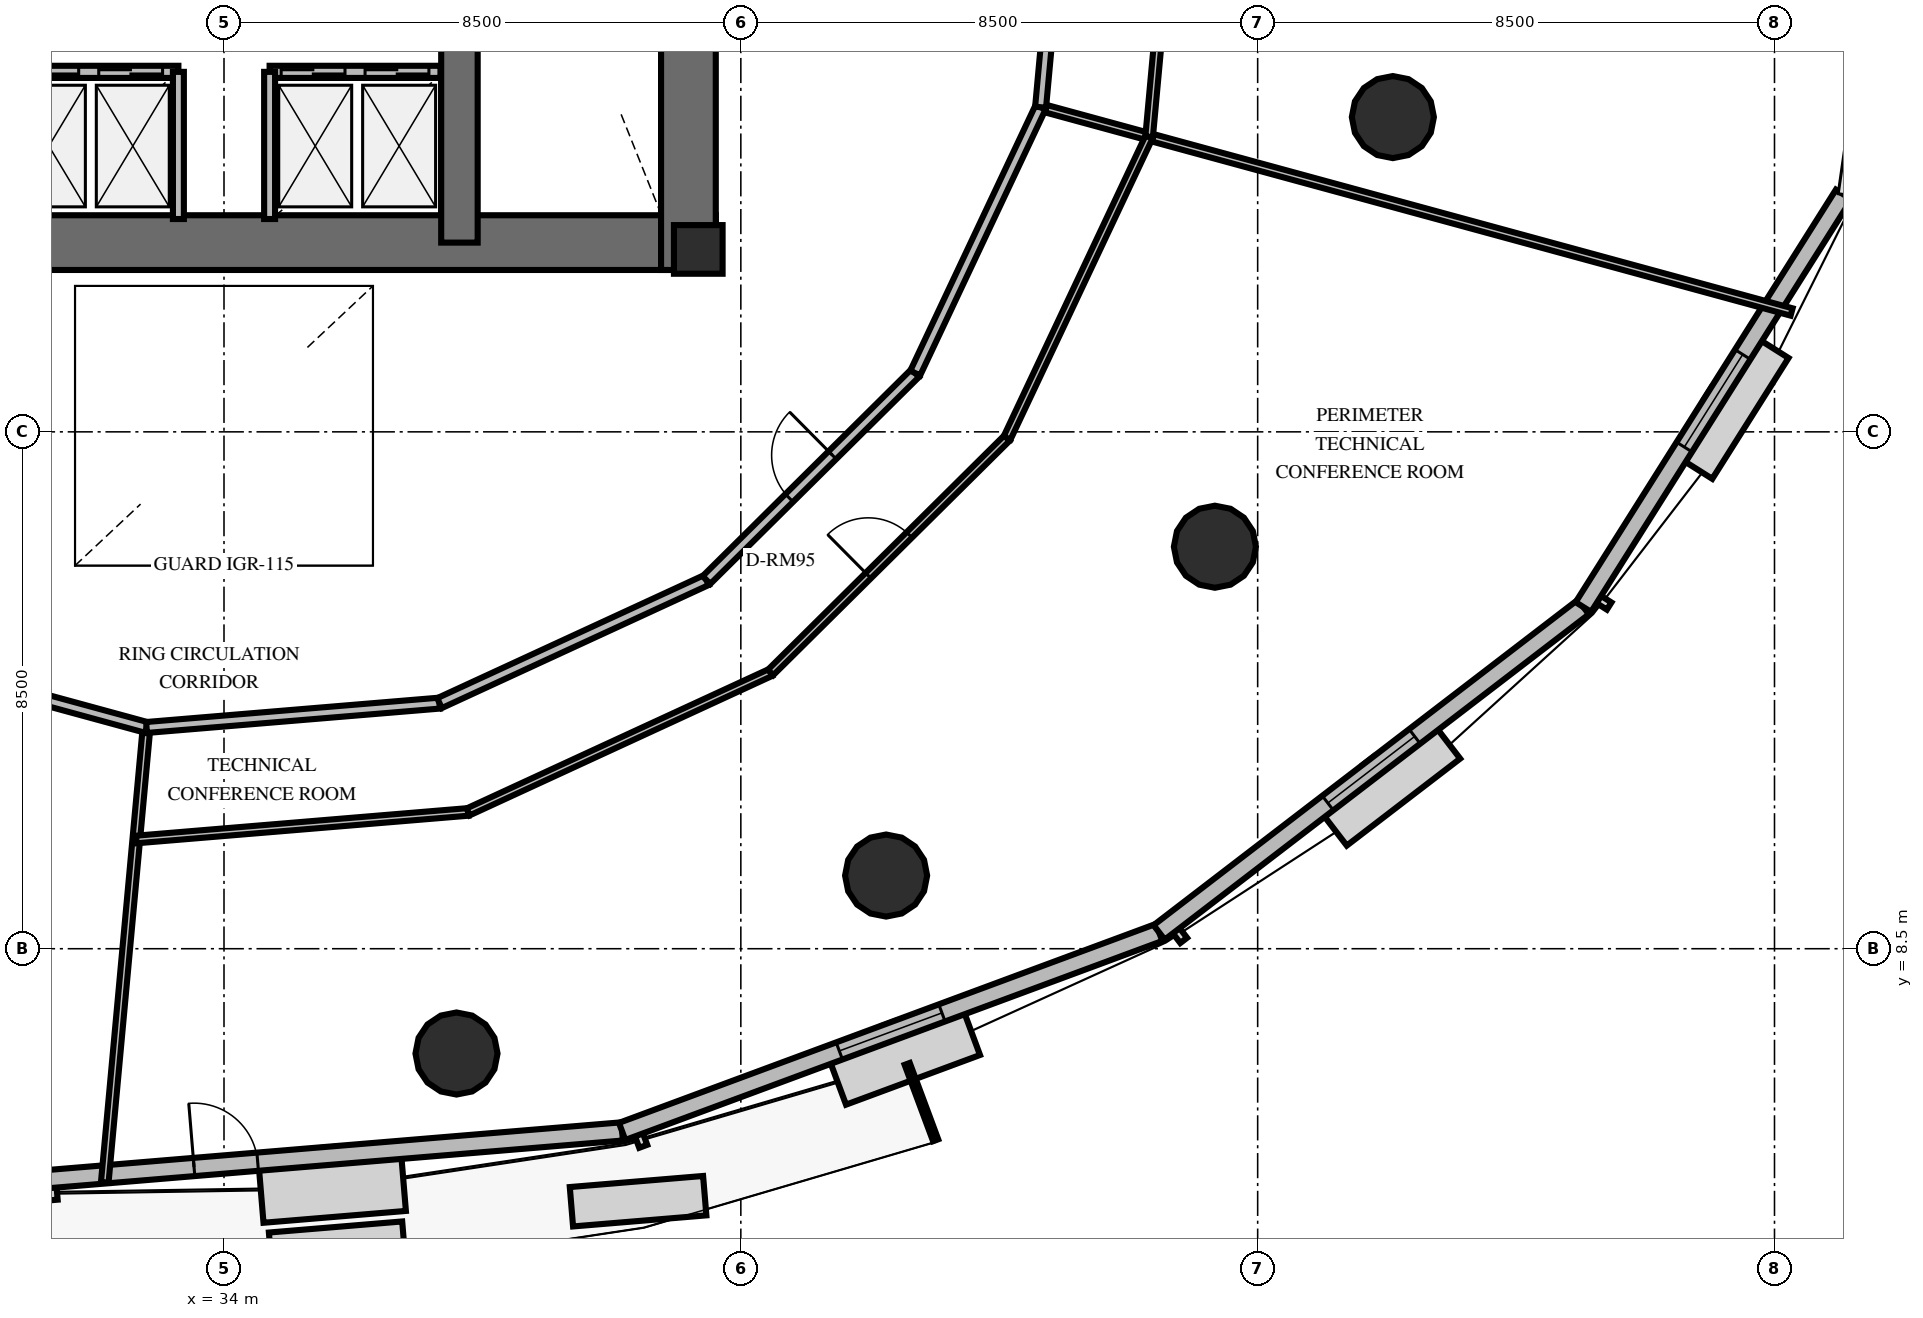
"""IFC4 building model, lengths in metres.
Left out: names, types, materials, properties, quantities, classifications, styles, units other than length and angle.
Written with IfcOpenShell. Run it as: python <this file> out.ifc"""

import sys

from ifc_helpers import new_model, si_unit, direction, frame, frame_2d, origin, origin_2d, place, context, subcontext, project, spatial, rectangle, circle, extrude, element, fill, save


model = new_model("IFC4")
c1 = context("Model", 3, precision=1e-05, world=origin(), true_north=direction((0.0, 1.0)))
c2 = subcontext(c1, "Body", "Model", "MODEL_VIEW")
j1 = project(units=[si_unit("LENGTHUNIT", "METRE"), si_unit("PLANEANGLEUNIT", "RADIAN")], contexts=[c1])
p1 = place(None, origin())
s1 = spatial("IfcSite", under=j1, at=p1, CompositionType="ELEMENT")
p2 = place(p1, origin())
s2 = spatial("IfcBuilding", under=s1, at=p2, CompositionType="ELEMENT")
p3 = place(p2, frame((0.0, 0.0, 51.0)))
s3 = spatial("IfcBuildingStorey", under=s2, at=p3, CompositionType="ELEMENT", Elevation=51.0)
p4 = place(p3, frame((25.922, 20.112, 0.0), z_axis=(0.0, 0.0, 1.0), x_axis=(1.0, 0.0, 0.0)))
e1 = element("IfcWall", 1, at=p4, inside=s3, PredefinedType="SHEAR", context=c2, shape_type="SweptSolid", body=[
    extrude(rectangle(XDim=16.166, YDim=0.9, at=frame_2d((8.083, 0.0))), origin(), (0.0, 0.0, 1.0), 4.2),
])
p5 = place(p3, frame((41.638, 19.662, 0.0), z_axis=(0.0, 0.0, 1.0), x_axis=(0.0, 1.0, 0.0)))
e2 = element("IfcWall", 2, at=p5, inside=s3, PredefinedType="SHEAR", context=c2, shape_type="SweptSolid", body=[
    extrude(rectangle(XDim=10.876, YDim=0.9, at=frame_2d((5.438, 0.0))), origin(), (0.0, 0.0, 1.0), 4.2),
])
p6 = place(p3, frame((37.872, 20.112, 0.0), z_axis=(0.0, 0.0, 1.0), x_axis=(0.0, 1.0, 0.0)))
e3 = element("IfcWall", 3, at=p6, inside=s3, PredefinedType="SHEAR", context=c2, shape_type="SweptSolid", body=[
    extrude(rectangle(XDim=9.976, YDim=0.6, at=frame_2d((4.988, 0.0))), origin(), (0.0, 0.0, 1.0), 4.2),
])
p7 = place(p3, frame((41.8, 20.0, 0.0), z_axis=(0.0, 0.0, 1.0), x_axis=(1.0, 0.0, 0.0)))
e4 = element("IfcColumn", 4, at=p7, inside=s3, PredefinedType="PILASTER", context=c2, shape_type="SweptSolid", body=[
    extrude(rectangle(XDim=0.8, YDim=0.8, at=origin_2d()), origin(), (0.0, 0.0, 1.0), 4.2),
])
for number, where, z_axis, x_axis in (
    (5, (37.824, 6.777, 0.0), (0.0, 0.0, 1.0), (1.0, 0.0, 0.0)),
    (6, (44.889, 9.703, 0.0), (0.0, 0.0, 1.0), (1.0, 0.0, 0.0)),
    (7, (50.297, 15.111, 0.0), (0.0, 0.0, 1.0), (1.0, 0.0, 0.0)),
    (8, (53.223, 22.176, 0.0), (0.0, 0.0, 1.0), (1.0, 0.0, 0.0)),
):
    element("IfcColumn", number, at=place(p3, frame(where, z_axis=z_axis, x_axis=x_axis)), inside=s3, PredefinedType="COLUMN", context=c2, shape_type="SweptSolid", body=[
        extrude(circle(Radius=0.675, at=origin_2d()), origin(), (0.0, 0.0, 1.0), 4.2),
    ])
p8 = place(p3, frame((30.926, 4.696, 0.0), z_axis=(0.0, 0.0, 1.0), x_axis=(0.99656491498, 0.082815277761, 0.0)))
e9 = element("IfcWall", 9, at=p8, inside=s3, PredefinedType="SOLIDWALL", context=c2, shape_type="SweptSolid", body=[
    extrude(rectangle(XDim=9.655, YDim=0.3, at=frame_2d((4.827, 0.0))), origin(), (0.0, 0.0, 1.0), 3.0),
])
p9 = place(p8, frame((2.59, 0.0, 0.0)))
e10 = element("IfcOpeningElement", 10, at=p9, cuts=e9, PredefinedType="OPENING", context=c2, shape_type="SweptSolid", body=[
    extrude(rectangle(XDim=1.05, YDim=2.15, at=frame_2d((0.525, 1.075))), frame((0.0, 0.16, 0.0), z_axis=(0.0, -1.0, 0.0), x_axis=(1.0, 0.0, 0.0)), (0.0, 0.0, 1.0), 0.32),
])
p10 = place(p3, frame((40.548, 5.495, 0.0), z_axis=(0.0, 0.0, 1.0), x_axis=(0.937694031854, 0.347462088042, 0.0)))
e11 = element("IfcWall", 11, at=p10, inside=s3, PredefinedType="SOLIDWALL", context=c2, shape_type="SweptSolid", body=[
    extrude(rectangle(XDim=9.419, YDim=0.3, at=frame_2d((4.709, 0.0))), origin(), (0.0, 0.0, 1.0), 3.0),
])
p11 = place(p10, frame((3.809, 0.0, 0.8)))
e12 = element("IfcOpeningElement", 12, at=p11, cuts=e11, PredefinedType="OPENING", context=c2, shape_type="SweptSolid", body=[
    extrude(rectangle(XDim=1.8, YDim=1.95, at=frame_2d((0.9, 0.975))), frame((0.0, 0.16, 0.0), z_axis=(0.0, -1.0, 0.0), x_axis=(1.0, 0.0, 0.0)), (0.0, 0.0, 1.0), 0.32),
])
p12 = place(p3, frame((49.38, 8.768, 0.0), z_axis=(0.0, 0.0, 1.0), x_axis=(0.793486127498, 0.608588338262, 0.0)))
e13 = element("IfcWall", 13, at=p12, inside=s3, PredefinedType="SOLIDWALL", context=c2, shape_type="SweptSolid", body=[
    extrude(rectangle(XDim=8.792, YDim=0.3, at=frame_2d((4.396, 0.0))), origin(), (0.0, 0.0, 1.0), 3.0),
])
p13 = place(p12, frame((3.496, 0.0, 0.8)))
e14 = element("IfcOpeningElement", 14, at=p13, cuts=e13, PredefinedType="OPENING", context=c2, shape_type="SweptSolid", body=[
    extrude(rectangle(XDim=1.8, YDim=1.95, at=frame_2d((0.9, 0.975))), frame((0.0, 0.16, 0.0), z_axis=(0.0, -1.0, 0.0), x_axis=(1.0, 0.0, 0.0)), (0.0, 0.0, 1.0), 0.32),
])
p14 = place(p3, frame((56.357, 14.119, 0.0), z_axis=(0.0, 0.0, 1.0), x_axis=(0.533594438525, 0.845740489261, 0.0)))
e15 = element("IfcWall", 15, at=p14, inside=s3, PredefinedType="SOLIDWALL", context=c2, shape_type="SweptSolid", body=[
    extrude(rectangle(XDim=8.021, YDim=0.3, at=frame_2d((4.011, 0.0))), origin(), (0.0, 0.0, 1.0), 3.0),
])
p15 = place(p14, frame((3.111, 0.0, 0.8)))
e16 = element("IfcOpeningElement", 16, at=p15, cuts=e15, PredefinedType="OPENING", context=c2, shape_type="SweptSolid", body=[
    extrude(rectangle(XDim=1.8, YDim=1.95, at=frame_2d((0.9, 0.975))), frame((0.0, 0.16, 0.0), z_axis=(0.0, -1.0, 0.0), x_axis=(1.0, 0.0, 0.0)), (0.0, 0.0, 1.0), 0.32),
])
p16 = place(p3, frame((30.44, 22.92, 0.0), z_axis=(0.0, 0.0, 1.0), x_axis=(1.0, 0.0, 0.0)))
e17 = element("IfcWall", 17, at=p16, inside=s3, PredefinedType="SOLIDWALL", context=c2, shape_type="SweptSolid", body=[
    extrude(rectangle(XDim=2.81, YDim=0.2, at=frame_2d((1.405, 0.0))), origin(), (0.0, 0.0, 1.0), 3.0),
])
p17 = place(p16, frame((0.12, 0.0, 0.0)))
e18 = element("IfcOpeningElement", 18, at=p17, cuts=e17, PredefinedType="OPENING", context=c2, shape_type="SweptSolid", body=[
    extrude(rectangle(XDim=1.05, YDim=2.1, at=frame_2d((0.525, 1.05))), frame((0.0, 0.11, 0.0), z_axis=(0.0, -1.0, 0.0), x_axis=(1.0, 0.0, 0.0)), (0.0, 0.0, 1.0), 0.22),
])
p18 = place(p16, frame((1.5, 0.0, 0.0)))
e19 = element("IfcOpeningElement", 19, at=p18, cuts=e17, PredefinedType="OPENING", context=c2, shape_type="SweptSolid", body=[
    extrude(rectangle(XDim=1.05, YDim=2.1, at=frame_2d((0.525, 1.05))), frame((0.0, 0.11, 0.0), z_axis=(0.0, -1.0, 0.0), x_axis=(1.0, 0.0, 0.0)), (0.0, 0.0, 1.0), 0.22),
])
p19 = place(p3, frame((33.25, 20.5, 0.0), z_axis=(0.0, 0.0, 1.0), x_axis=(0.0, 1.0, 0.0)))
e20 = element("IfcWall", 20, at=p19, inside=s3, PredefinedType="SOLIDWALL", context=c2, shape_type="SweptSolid", body=[
    extrude(rectangle(XDim=2.42, YDim=0.18, at=frame_2d((1.21, 0.0))), origin(), (0.0, 0.0, 1.0), 3.0),
])
p20 = place(p3, frame((34.75, 22.92, 0.0), z_axis=(0.0, 0.0, 1.0), x_axis=(1.0, 0.0, 0.0)))
e21 = element("IfcWall", 21, at=p20, inside=s3, PredefinedType="SOLIDWALL", context=c2, shape_type="SweptSolid", body=[
    extrude(rectangle(XDim=2.81, YDim=0.2, at=frame_2d((1.405, 0.0))), origin(), (0.0, 0.0, 1.0), 3.0),
])
p21 = place(p20, frame((0.19, 0.0, 0.0)))
e22 = element("IfcOpeningElement", 22, at=p21, cuts=e21, PredefinedType="OPENING", context=c2, shape_type="SweptSolid", body=[
    extrude(rectangle(XDim=1.05, YDim=2.1, at=frame_2d((0.525, 1.05))), frame((0.0, 0.11, 0.0), z_axis=(0.0, -1.0, 0.0), x_axis=(1.0, 0.0, 0.0)), (0.0, 0.0, 1.0), 0.22),
])
p22 = place(p20, frame((1.57, 0.0, 0.0)))
e23 = element("IfcOpeningElement", 23, at=p22, cuts=e21, PredefinedType="OPENING", context=c2, shape_type="SweptSolid", body=[
    extrude(rectangle(XDim=1.05, YDim=2.1, at=frame_2d((0.525, 1.05))), frame((0.0, 0.11, 0.0), z_axis=(0.0, -1.0, 0.0), x_axis=(1.0, 0.0, 0.0)), (0.0, 0.0, 1.0), 0.22),
])
p23 = place(p3, frame((34.75, 20.5, 0.0), z_axis=(0.0, 0.0, 1.0), x_axis=(0.0, 1.0, 0.0)))
e24 = element("IfcWall", 24, at=p23, inside=s3, PredefinedType="SOLIDWALL", context=c2, shape_type="SweptSolid", body=[
    extrude(rectangle(XDim=2.42, YDim=0.18, at=frame_2d((1.21, 0.0))), origin(), (0.0, 0.0, 1.0), 3.0),
])
p24 = place(p3, frame((32.726, 12.138, 0.0), z_axis=(0.0, 0.0, 1.0), x_axis=(-0.091496605753, -0.995805388184, 0.0)))
e25 = element("IfcWall", 25, at=p24, inside=s3, PredefinedType="PARTITIONING", context=c2, shape_type="SweptSolid", body=[
    extrude(rectangle(XDim=7.514, YDim=0.125, at=frame_2d((3.757, 0.0))), origin(), (0.0, 0.0, 1.0), 3.0),
])
p25 = place(p3, frame((28.062, 13.41, 0.0), z_axis=(0.0, 0.0, 1.0), x_axis=(0.964791786171, -0.26301484623, 0.0)))
e26 = element("IfcWall", 26, at=p25, inside=s3, PredefinedType="PARTITIONING", context=c2, shape_type="SweptSolid", body=[
    extrude(rectangle(XDim=4.834, YDim=0.18, at=frame_2d((2.417, 0.0))), origin(), (0.0, 0.0, 1.0), 3.0),
])
p26 = place(p25, frame((0.996, 0.0, 0.0)))
e27 = element("IfcOpeningElement", 27, at=p26, cuts=e26, PredefinedType="OPENING", context=c2, shape_type="SweptSolid", body=[
    extrude(rectangle(XDim=1.15, YDim=2.15, at=frame_2d((0.575, 1.075))), frame((0.0, 0.1, 0.0), z_axis=(0.0, -1.0, 0.0), x_axis=(1.0, 0.0, 0.0)), (0.0, 0.0, 1.0), 0.2),
])
p27 = place(p3, frame((47.43, 22.339, 0.0), z_axis=(0.0, 0.0, 1.0), x_axis=(0.964787141469, -0.263031883347, 0.0)))
e28 = element("IfcWall", 28, at=p27, inside=s3, PredefinedType="PARTITIONING", context=c2, shape_type="SweptSolid", body=[
    extrude(rectangle(XDim=12.802, YDim=0.125, at=frame_2d((6.401, 0.0))), origin(), (0.0, 0.0, 1.0), 3.0),
])
p28 = place(p3, frame((32.726, 12.138, 0.0), z_axis=(0.0, 0.0, 1.0), x_axis=(0.99656453954, 0.082819795523, 0.0)))
e29 = element("IfcWall", 29, at=p28, inside=s3, PredefinedType="PARTITIONING", context=c2, shape_type="SweptSolid", body=[
    extrude(rectangle(XDim=4.834, YDim=0.18, at=frame_2d((2.417, 0.0))), origin(), (0.0, 0.0, 1.0), 3.0),
])
p29 = place(p3, frame((37.544, 12.539, 0.0), z_axis=(0.0, 0.0, 1.0), x_axis=(0.908139632041, 0.418667420177, 0.0)))
e30 = element("IfcWall", 30, at=p29, inside=s3, PredefinedType="PARTITIONING", context=c2, shape_type="SweptSolid", body=[
    extrude(rectangle(XDim=4.834, YDim=0.18, at=frame_2d((2.417, 0.0))), origin(), (0.0, 0.0, 1.0), 3.0),
])
p30 = place(p3, frame((41.934, 14.563, 0.0), z_axis=(0.0, 0.0, 1.0), x_axis=(0.710205816499, 0.703994103818, 0.0)))
e31 = element("IfcWall", 31, at=p30, inside=s3, PredefinedType="PARTITIONING", context=c2, shape_type="SweptSolid", body=[
    extrude(rectangle(XDim=4.834, YDim=0.18, at=frame_2d((2.417, 0.0))), origin(), (0.0, 0.0, 1.0), 3.0),
])
p31 = place(p30, frame((1.917, 0.0, 0.0)))
e32 = element("IfcOpeningElement", 32, at=p31, cuts=e31, PredefinedType="OPENING", context=c2, shape_type="SweptSolid", body=[
    extrude(rectangle(XDim=1.0, YDim=2.15, at=frame_2d((0.5, 1.075))), frame((0.0, 0.1, 0.0), z_axis=(0.0, -1.0, 0.0), x_axis=(1.0, 0.0, 0.0)), (0.0, 0.0, 1.0), 0.2),
])
p32 = place(p3, frame((45.368, 17.966, 0.0), z_axis=(0.0, 0.0, 1.0), x_axis=(0.426531377893, 0.904472765578, 0.0)))
e33 = element("IfcWall", 33, at=p32, inside=s3, PredefinedType="PARTITIONING", context=c2, shape_type="SweptSolid", body=[
    extrude(rectangle(XDim=4.834, YDim=0.18, at=frame_2d((2.417, 0.0))), origin(), (0.0, 0.0, 1.0), 3.0),
])
p33 = place(p3, frame((32.557, 10.296, 0.0), z_axis=(0.0, 0.0, 1.0), x_axis=(0.996564485103, 0.082820450567, 0.0)))
e34 = element("IfcWall", 34, at=p33, inside=s3, PredefinedType="PARTITIONING", context=c2, shape_type="SweptSolid", body=[
    extrude(rectangle(XDim=5.477, YDim=0.125, at=frame_2d((2.739, 0.0))), origin(), (0.0, 0.0, 1.0), 3.0),
])
p34 = place(p3, frame((38.015, 10.75, 0.0), z_axis=(0.0, 0.0, 1.0), x_axis=(0.908153692654, 0.41863691968, 0.0)))
e35 = element("IfcWall", 35, at=p34, inside=s3, PredefinedType="PARTITIONING", context=c2, shape_type="SweptSolid", body=[
    extrude(rectangle(XDim=5.477, YDim=0.125, at=frame_2d((2.738, 0.0))), origin(), (0.0, 0.0, 1.0), 3.0),
])
p35 = place(p3, frame((42.989, 13.042, 0.0), z_axis=(0.0, 0.0, 1.0), x_axis=(0.710175796822, 0.704024387083, 0.0)))
e36 = element("IfcWall", 36, at=p35, inside=s3, PredefinedType="PARTITIONING", context=c2, shape_type="SweptSolid", body=[
    extrude(rectangle(XDim=5.477, YDim=0.125, at=frame_2d((2.739, 0.0))), origin(), (0.0, 0.0, 1.0), 3.0),
])
p36 = place(p35, frame((2.263, 0.0, 0.0)))
e37 = element("IfcOpeningElement", 37, at=p36, cuts=e36, PredefinedType="OPENING", context=c2, shape_type="SweptSolid", body=[
    extrude(rectangle(XDim=0.95, YDim=2.15, at=frame_2d((0.475, 1.075))), frame((0.0, 0.073, 0.0), z_axis=(0.0, -1.0, 0.0), x_axis=(1.0, 0.0, 0.0)), (0.0, 0.0, 1.0), 0.145),
])
p37 = place(p3, frame((46.878, 16.898, 0.0), z_axis=(0.0, 0.0, 1.0), x_axis=(0.426554691337, 0.904461771054, 0.0)))
e38 = element("IfcWall", 38, at=p37, inside=s3, PredefinedType="PARTITIONING", context=c2, shape_type="SweptSolid", body=[
    extrude(rectangle(XDim=5.477, YDim=0.125, at=frame_2d((2.738, 0.0))), origin(), (0.0, 0.0, 1.0), 3.0),
])
p38 = place(p3, frame((47.43, 22.339, 0.0), z_axis=(0.0, 0.0, 1.0), x_axis=(0.091560227549, 0.995799540435, 0.0)))
e39 = element("IfcWall", 39, at=p38, inside=s3, PredefinedType="PARTITIONING", context=c2, shape_type="SweptSolid", body=[
    extrude(rectangle(XDim=4.834, YDim=0.18, at=frame_2d((2.417, 0.0))), origin(), (0.0, 0.0, 1.0), 3.0),
])
p39 = place(p38, frame((2.801, 0.0, 0.0)))
e40 = element("IfcOpeningElement", 40, at=p39, cuts=e39, PredefinedType="OPENING", context=c2, shape_type="SweptSolid", body=[
    extrude(rectangle(XDim=1.0, YDim=2.15, at=frame_2d((0.5, 1.075))), frame((0.0, 0.1, 0.0), z_axis=(0.0, -1.0, 0.0), x_axis=(1.0, 0.0, 0.0)), (0.0, 0.0, 1.0), 0.2),
])
p40 = place(p3, frame((49.215, 21.852, 0.0), z_axis=(0.0, 0.0, 1.0), x_axis=(0.091516394144, 0.995803569788, 0.0)))
e41 = element("IfcWall", 41, at=p40, inside=s3, PredefinedType="PARTITIONING", context=c2, shape_type="SweptSolid", body=[
    extrude(rectangle(XDim=5.477, YDim=0.125, at=frame_2d((2.738, 0.0))), origin(), (0.0, 0.0, 1.0), 3.0),
])
p41 = place(p40, frame((3.305, 0.0, 0.0)))
e42 = element("IfcOpeningElement", 42, at=p41, cuts=e41, PredefinedType="OPENING", context=c2, shape_type="SweptSolid", body=[
    extrude(rectangle(XDim=0.95, YDim=2.15, at=frame_2d((0.475, 1.075))), frame((0.0, 0.073, 0.0), z_axis=(0.0, -1.0, 0.0), x_axis=(1.0, 0.0, 0.0)), (0.0, 0.0, 1.0), 0.145),
])
p42 = place(p9, origin())
e43 = element("IfcDoor", 43, at=p42, inside=s3, OperationType="SINGLE_SWING_LEFT", PredefinedType="DOOR", context=c2, shape_type="SweptSolid", body=[
    extrude(rectangle(XDim=1.05, YDim=2.15, at=frame_2d((0.525, 1.075))), frame((0.0, 0.025, 0.0), z_axis=(0.0, -1.0, 0.0), x_axis=(1.0, 0.0, 0.0)), (0.0, 0.0, 1.0), 0.05),
])
fill(e10, e43)
p43 = place(p11, origin())
e44 = element("IfcWindow", 44, at=p43, inside=s3, PartitioningType="SINGLE_PANEL", PredefinedType="WINDOW", context=c2, shape_type="SweptSolid", body=[
    extrude(rectangle(XDim=1.8, YDim=1.95, at=frame_2d((0.9, 0.975))), frame((0.0, 0.03, 0.0), z_axis=(0.0, -1.0, 0.0), x_axis=(1.0, 0.0, 0.0)), (0.0, 0.0, 1.0), 0.06),
])
fill(e12, e44)
p44 = place(p13, origin())
e45 = element("IfcWindow", 45, at=p44, inside=s3, PartitioningType="SINGLE_PANEL", PredefinedType="WINDOW", context=c2, shape_type="SweptSolid", body=[
    extrude(rectangle(XDim=1.8, YDim=1.95, at=frame_2d((0.9, 0.975))), frame((0.0, 0.03, 0.0), z_axis=(0.0, -1.0, 0.0), x_axis=(1.0, 0.0, 0.0)), (0.0, 0.0, 1.0), 0.06),
])
fill(e14, e45)
p45 = place(p15, origin())
e46 = element("IfcWindow", 46, at=p45, inside=s3, PartitioningType="SINGLE_PANEL", PredefinedType="WINDOW", context=c2, shape_type="SweptSolid", body=[
    extrude(rectangle(XDim=1.8, YDim=1.95, at=frame_2d((0.9, 0.975))), frame((0.0, 0.03, 0.0), z_axis=(0.0, -1.0, 0.0), x_axis=(1.0, 0.0, 0.0)), (0.0, 0.0, 1.0), 0.06),
])
fill(e16, e46)
p46 = place(p17, origin())
e47 = element("IfcDoor", 47, at=p46, inside=s3, OperationType="DOUBLE_DOOR_SLIDING", PredefinedType="USERDEFINED", context=c2, shape_type="SweptSolid", body=[
    extrude(rectangle(XDim=1.05, YDim=2.1, at=frame_2d((0.525, 1.05))), frame((0.0, 0.025, 0.0), z_axis=(0.0, -1.0, 0.0), x_axis=(1.0, 0.0, 0.0)), (0.0, 0.0, 1.0), 0.05),
])
fill(e18, e47)
p47 = place(p18, origin())
e48 = element("IfcDoor", 48, at=p47, inside=s3, OperationType="DOUBLE_DOOR_SLIDING", PredefinedType="USERDEFINED", context=c2, shape_type="SweptSolid", body=[
    extrude(rectangle(XDim=1.05, YDim=2.1, at=frame_2d((0.525, 1.05))), frame((0.0, 0.025, 0.0), z_axis=(0.0, -1.0, 0.0), x_axis=(1.0, 0.0, 0.0)), (0.0, 0.0, 1.0), 0.05),
])
fill(e19, e48)
p48 = place(p21, origin())
e49 = element("IfcDoor", 49, at=p48, inside=s3, OperationType="DOUBLE_DOOR_SLIDING", PredefinedType="USERDEFINED", context=c2, shape_type="SweptSolid", body=[
    extrude(rectangle(XDim=1.05, YDim=2.1, at=frame_2d((0.525, 1.05))), frame((0.0, 0.025, 0.0), z_axis=(0.0, -1.0, 0.0), x_axis=(1.0, 0.0, 0.0)), (0.0, 0.0, 1.0), 0.05),
])
fill(e22, e49)
p49 = place(p22, origin())
e50 = element("IfcDoor", 50, at=p49, inside=s3, OperationType="DOUBLE_DOOR_SLIDING", PredefinedType="USERDEFINED", context=c2, shape_type="SweptSolid", body=[
    extrude(rectangle(XDim=1.05, YDim=2.1, at=frame_2d((0.525, 1.05))), frame((0.0, 0.025, 0.0), z_axis=(0.0, -1.0, 0.0), x_axis=(1.0, 0.0, 0.0)), (0.0, 0.0, 1.0), 0.05),
])
fill(e23, e50)
p50 = place(p31, origin())
e51 = element("IfcDoor", 51, at=p50, inside=s3, OperationType="SINGLE_SWING_RIGHT", PredefinedType="DOOR", context=c2, shape_type="SweptSolid", body=[
    extrude(rectangle(XDim=1.0, YDim=2.15, at=frame_2d((0.5, 1.075))), frame((0.0, 0.025, 0.0), z_axis=(0.0, -1.0, 0.0), x_axis=(1.0, 0.0, 0.0)), (0.0, 0.0, 1.0), 0.05),
])
fill(e32, e51)
p51 = place(p36, origin())
e52 = element("IfcDoor", 52, at=p51, inside=s3, OperationType="SINGLE_SWING_LEFT", PredefinedType="DOOR", context=c2, shape_type="SweptSolid", body=[
    extrude(rectangle(XDim=0.95, YDim=2.15, at=frame_2d((0.475, 1.075))), frame((0.0, 0.025, 0.0), z_axis=(0.0, -1.0, 0.0), x_axis=(1.0, 0.0, 0.0)), (0.0, 0.0, 1.0), 0.05),
])
fill(e37, e52)
save(model, sys.argv[1])
